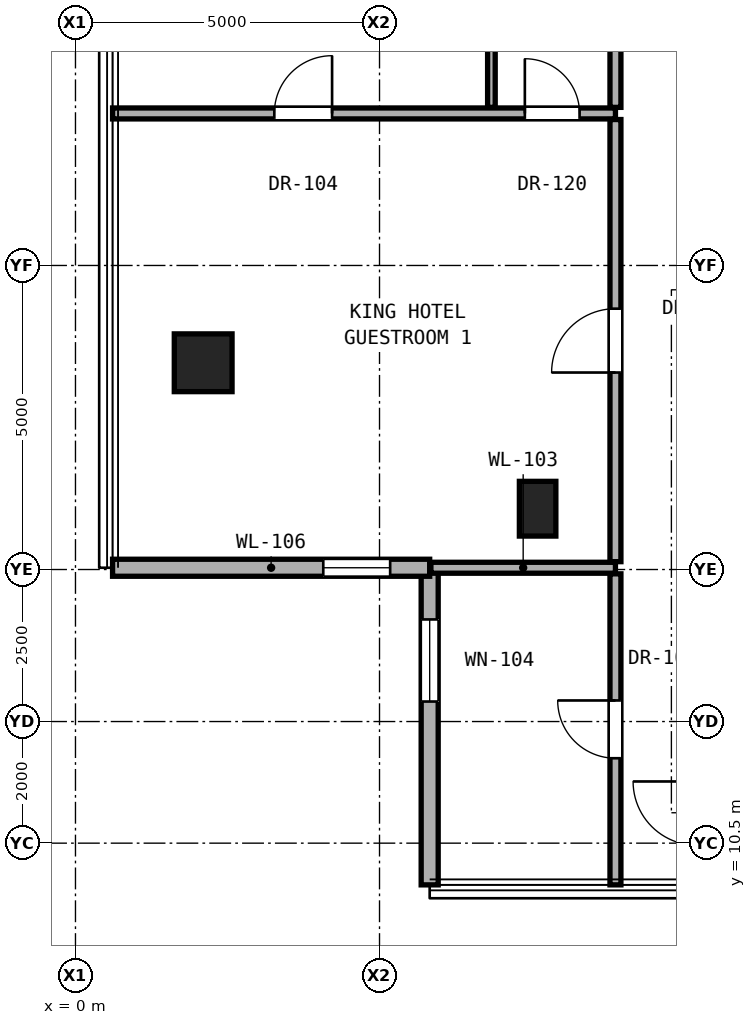
"""IFC4 building model, lengths in metres.
Left out: names, types, materials, properties, quantities, classifications, styles, units other than length and angle.
Written with IfcOpenShell. Run it as: python <this file> out.ifc"""

import sys

from ifc_helpers import new_model, si_unit, direction, frame, frame_2d, origin, origin_2d, place, context, subcontext, project, spatial, rectangle, hollow_rectangle, extrude, element, fill, save


model = new_model("IFC4")
c1 = context("Model", 3, precision=1e-05, world=origin(), true_north=direction((0.0, 1.0)))
c2 = subcontext(c1, "Body", "Model", "MODEL_VIEW")
j1 = project(units=[si_unit("LENGTHUNIT", "METRE"), si_unit("PLANEANGLEUNIT", "RADIAN")], contexts=[c1])
p1 = place(None, origin())
s1 = spatial("IfcSite", under=j1, at=p1, CompositionType="ELEMENT")
p2 = place(p1, origin())
s2 = spatial("IfcBuilding", under=s1, at=p2, CompositionType="ELEMENT")
p3 = place(p2, frame((0.0, 0.0, 190.15)))
s3 = spatial("IfcBuildingStorey", under=s2, at=p3, CompositionType="ELEMENT", Elevation=190.15)
p4 = place(p3, frame((2.1, 18.4, 0.0), z_axis=(0.0, 0.0, 1.0), x_axis=(1.0, 0.0, 0.0)))
e1 = element("IfcColumn", 1, at=p4, inside=s3, PredefinedType="COLUMN", context=c2, shape_type="SweptSolid", body=[
    extrude(hollow_rectangle(XDim=0.95, YDim=0.95, WallThickness=0.05, at=origin_2d()), origin(), (0.0, 0.0, 1.0), 3.25),
])
p5 = place(p3, frame((7.6, 16.0, 0.0), z_axis=(0.0, 0.0, 1.0), x_axis=(1.0, 0.0, 0.0)))
e2 = element("IfcColumn", 2, at=p5, inside=s3, PredefinedType="PILASTER", context=c2, shape_type="SweptSolid", body=[
    extrude(rectangle(XDim=0.6, YDim=0.9, at=origin_2d()), origin(), (0.0, 0.0, 1.0), 3.25),
])
p6 = place(p3, frame((5.825, 15.029, 0.0), z_axis=(0.0, 0.0, 1.0), x_axis=(0.0, -1.0, 0.0)))
e3 = element("IfcWall", 3, at=p6, inside=s3, PredefinedType="SOLIDWALL", context=c2, shape_type="SweptSolid", body=[
    extrude(rectangle(XDim=5.215, YDim=0.28, at=frame_2d((2.607, 0.0))), origin(), (0.0, 0.0, 1.0), 3.03),
])
p7 = place(p6, frame((0.85, 0.0, 0.68)))
e4 = element("IfcOpeningElement", 4, at=p7, cuts=e3, PredefinedType="OPENING", context=c2, shape_type="SweptSolid", body=[
    extrude(rectangle(XDim=1.35, YDim=2.2, at=frame_2d((0.675, 1.1))), frame((0.0, 0.15, 0.0), z_axis=(0.0, -1.0, 0.0), x_axis=(1.0, 0.0, 0.0)), (0.0, 0.0, 1.0), 0.3),
])
p8 = place(p3, frame((0.61, 15.029, 0.0), z_axis=(0.0, 0.0, 1.0), x_axis=(1.0, 0.0, 0.0)))
e5 = element("IfcWall", 5, at=p8, inside=s3, PredefinedType="SOLIDWALL", context=c2, shape_type="SweptSolid", body=[
    extrude(rectangle(XDim=5.215, YDim=0.28, at=frame_2d((2.607, 0.0))), origin(), (0.0, 0.0, 1.0), 3.03),
])
p9 = place(p8, frame((3.465, 0.0, 0.85)))
e6 = element("IfcOpeningElement", 6, at=p9, cuts=e5, PredefinedType="OPENING", context=c2, shape_type="SweptSolid", body=[
    extrude(rectangle(XDim=1.1, YDim=2.0, at=frame_2d((0.55, 1.0))), frame((0.0, 0.15, 0.0), z_axis=(0.0, -1.0, 0.0), x_axis=(1.0, 0.0, 0.0)), (0.0, 0.0, 1.0), 0.3),
])
p10 = place(p3, frame((5.845, 15.029, 0.0), z_axis=(0.0, 0.0, 1.0), x_axis=(1.0, 0.0, 0.0)))
e7 = element("IfcWall", 7, at=p10, inside=s3, PredefinedType="PARTITIONING", context=c2, shape_type="SweptSolid", body=[
    extrude(rectangle(XDim=3.035, YDim=0.18, at=frame_2d((1.518, 0.0))), origin(), (0.0, 0.0, 1.0), 3.05),
])
p11 = place(p3, frame((0.61, 22.5, 0.0), z_axis=(0.0, 0.0, 1.0), x_axis=(1.0, 0.0, 0.0)))
e8 = element("IfcWall", 8, at=p11, inside=s3, PredefinedType="PARTITIONING", context=c2, shape_type="SweptSolid", body=[
    extrude(rectangle(XDim=8.27, YDim=0.18, at=frame_2d((4.135, 0.0))), origin(), (0.0, 0.0, 1.0), 2.269),
])
p12 = place(p11, frame((2.66, 0.0, 0.0)))
e9 = element("IfcOpeningElement", 9, at=p12, cuts=e8, PredefinedType="OPENING", context=c2, shape_type="SweptSolid", body=[
    extrude(rectangle(XDim=0.95, YDim=2.15, at=frame_2d((0.475, 1.075))), frame((0.0, 0.1, 0.0), z_axis=(0.0, -1.0, 0.0), x_axis=(1.0, 0.0, 0.0)), (0.0, 0.0, 1.0), 0.2),
])
p13 = place(p11, frame((6.78, 0.0, 0.0)))
e10 = element("IfcOpeningElement", 10, at=p13, cuts=e8, PredefinedType="OPENING", context=c2, shape_type="SweptSolid", body=[
    extrude(rectangle(XDim=0.9, YDim=2.1, at=frame_2d((0.45, 1.05))), frame((0.0, 0.1, 0.0), z_axis=(0.0, -1.0, 0.0), x_axis=(1.0, 0.0, 0.0)), (0.0, 0.0, 1.0), 0.2),
])
p14 = place(p3, frame((6.84, 22.6, 0.0), z_axis=(0.0, 0.0, 1.0), x_axis=(0.0, 1.0, 0.0)))
e11 = element("IfcWall", 11, at=p14, inside=s3, PredefinedType="PARTITIONING", context=c2, shape_type="SweptSolid", body=[
    extrude(rectangle(XDim=2.1, YDim=0.125, at=frame_2d((1.05, 0.0))), origin(), (0.0, 0.0, 1.0), 2.346),
])
p15 = place(p3, frame((8.88, 9.814, 0.0), z_axis=(0.0, 0.0, 1.0), x_axis=(0.0, 1.0, 0.0)))
e12 = element("IfcWall", 12, at=p15, inside=s3, PredefinedType="PARTITIONING", context=c2, shape_type="SweptSolid", body=[
    extrude(rectangle(XDim=5.115, YDim=0.18, at=frame_2d((2.558, 0.0))), origin(), (0.0, 0.0, 1.0), 3.05),
])
p16 = place(p15, frame((2.083, 0.0, 0.0)))
e13 = element("IfcOpeningElement", 13, at=p16, cuts=e12, PredefinedType="OPENING", context=c2, shape_type="SweptSolid", body=[
    extrude(rectangle(XDim=0.95, YDim=2.15, at=frame_2d((0.475, 1.075))), frame((0.0, 0.1, 0.0), z_axis=(0.0, -1.0, 0.0), x_axis=(1.0, 0.0, 0.0)), (0.0, 0.0, 1.0), 0.2),
])
p17 = place(p3, frame((8.88, 15.129, 0.0), z_axis=(0.0, 0.0, 1.0), x_axis=(0.0, 1.0, 0.0)))
e14 = element("IfcWall", 14, at=p17, inside=s3, PredefinedType="PARTITIONING", context=c2, shape_type="SweptSolid", body=[
    extrude(rectangle(XDim=7.271, YDim=0.18, at=frame_2d((3.635, 0.0))), origin(), (0.0, 0.0, 1.0), 2.442),
])
p18 = place(p17, frame((3.111, 0.0, 0.0)))
e15 = element("IfcOpeningElement", 15, at=p18, cuts=e14, PredefinedType="OPENING", context=c2, shape_type="SweptSolid", body=[
    extrude(rectangle(XDim=1.05, YDim=2.2, at=frame_2d((0.525, 1.1))), frame((0.0, 0.1, 0.0), z_axis=(0.0, -1.0, 0.0), x_axis=(1.0, 0.0, 0.0)), (0.0, 0.0, 1.0), 0.2),
])
p19 = place(p3, frame((8.88, 22.6, 0.0), z_axis=(0.0, 0.0, 1.0), x_axis=(0.0, 1.0, 0.0)))
e16 = element("IfcWall", 16, at=p19, inside=s3, PredefinedType="PARTITIONING", context=c2, shape_type="SweptSolid", body=[
    extrude(rectangle(XDim=2.1, YDim=0.18, at=frame_2d((1.05, 0.0))), origin(), (0.0, 0.0, 1.0), 2.346),
])
p20 = place(p7, origin())
e17 = element("IfcWindow", 17, at=p20, inside=s3, PartitioningType="SINGLE_PANEL", PredefinedType="WINDOW", context=c2, shape_type="SweptSolid", body=[
    extrude(rectangle(XDim=1.35, YDim=2.2, at=frame_2d((0.675, 1.1))), frame((0.0, 0.03, 0.0), z_axis=(0.0, -1.0, 0.0), x_axis=(1.0, 0.0, 0.0)), (0.0, 0.0, 1.0), 0.06),
])
fill(e4, e17)
p21 = place(p9, origin())
e18 = element("IfcWindow", 18, at=p21, inside=s3, PartitioningType="SINGLE_PANEL", PredefinedType="WINDOW", context=c2, shape_type="SweptSolid", body=[
    extrude(rectangle(XDim=1.1, YDim=2.0, at=frame_2d((0.55, 1.0))), frame((0.0, 0.03, 0.0), z_axis=(0.0, -1.0, 0.0), x_axis=(1.0, 0.0, 0.0)), (0.0, 0.0, 1.0), 0.06),
])
fill(e6, e18)
p22 = place(p18, origin())
e19 = element("IfcDoor", 19, at=p22, inside=s3, OperationType="SINGLE_SWING_LEFT", PredefinedType="DOOR", context=c2, shape_type="SweptSolid", body=[
    extrude(rectangle(XDim=1.05, YDim=2.2, at=frame_2d((0.525, 1.1))), frame((0.0, 0.025, 0.0), z_axis=(0.0, -1.0, 0.0), x_axis=(1.0, 0.0, 0.0)), (0.0, 0.0, 1.0), 0.05),
])
fill(e15, e19)
p23 = place(p12, origin())
e20 = element("IfcDoor", 20, at=p23, inside=s3, OperationType="SINGLE_SWING_RIGHT", PredefinedType="DOOR", context=c2, shape_type="SweptSolid", body=[
    extrude(rectangle(XDim=0.95, YDim=2.15, at=frame_2d((0.475, 1.075))), frame((0.0, 0.025, 0.0), z_axis=(0.0, -1.0, 0.0), x_axis=(1.0, 0.0, 0.0)), (0.0, 0.0, 1.0), 0.05),
])
fill(e9, e20)
p24 = place(p13, origin())
e21 = element("IfcDoor", 21, at=p24, inside=s3, OperationType="SINGLE_SWING_LEFT", PredefinedType="DOOR", context=c2, shape_type="SweptSolid", body=[
    extrude(rectangle(XDim=0.9, YDim=2.1, at=frame_2d((0.45, 1.05))), frame((0.0, 0.025, 0.0), z_axis=(0.0, -1.0, 0.0), x_axis=(1.0, 0.0, 0.0)), (0.0, 0.0, 1.0), 0.05),
])
fill(e10, e21)
p25 = place(p16, origin())
e22 = element("IfcDoor", 22, at=p25, inside=s3, OperationType="SINGLE_SWING_RIGHT", PredefinedType="DOOR", context=c2, shape_type="SweptSolid", body=[
    extrude(rectangle(XDim=0.95, YDim=2.15, at=frame_2d((0.475, 1.075))), frame((0.0, 0.025, 0.0), z_axis=(0.0, -1.0, 0.0), x_axis=(1.0, 0.0, 0.0)), (0.0, 0.0, 1.0), 0.05),
])
fill(e13, e22)
save(model, sys.argv[1])
